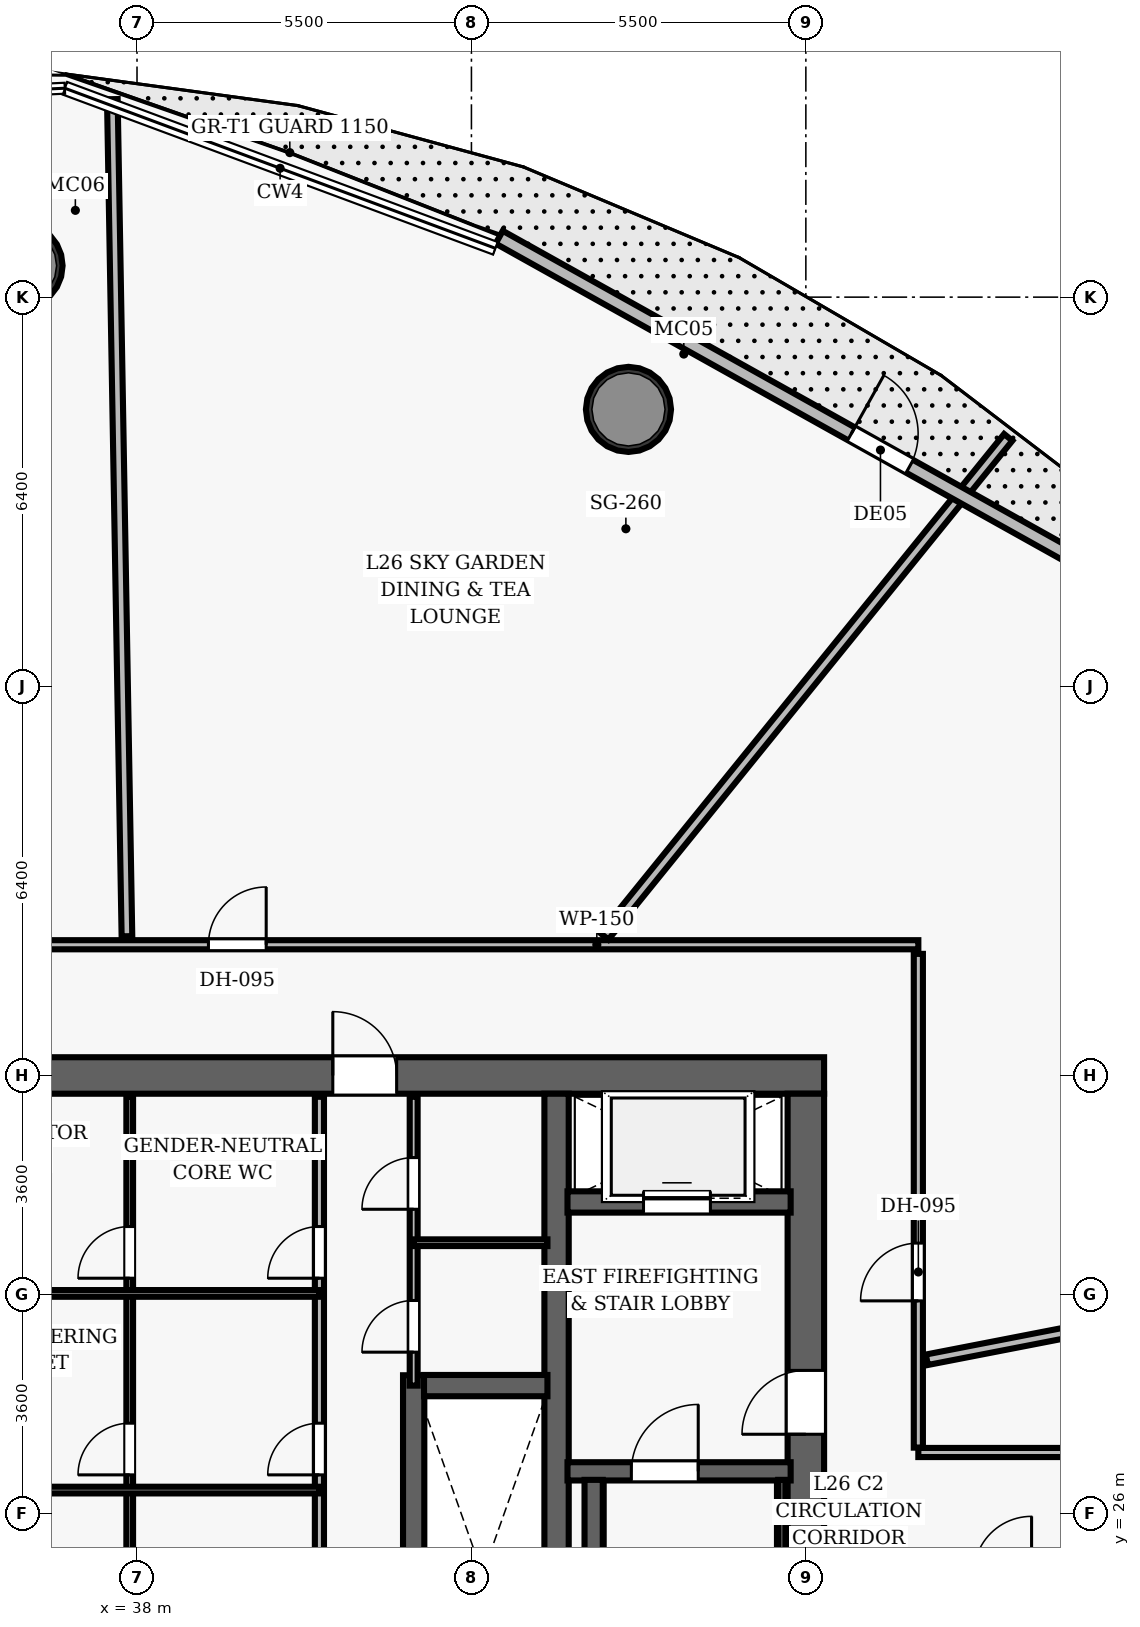
"""IFC4 building model, lengths in metres.
Left out: names, types, materials, properties, quantities, classifications, styles, units other than length and angle.
Written with IfcOpenShell. Run it as: python <this file> out.ifc"""

import sys

from ifc_helpers import new_model, si_unit, direction, frame, frame_2d, origin, origin_2d, place, context, subcontext, project, spatial, rectangle, hollow_circle, extrude, element, fill, save


model = new_model("IFC4")
c1 = context("Model", 3, precision=1e-05, world=origin(), true_north=direction((0.0, 1.0)))
c2 = subcontext(c1, "Body", "Model", "MODEL_VIEW")
j1 = project(units=[si_unit("LENGTHUNIT", "METRE"), si_unit("PLANEANGLEUNIT", "RADIAN")], contexts=[c1])
p1 = place(None, origin())
s1 = spatial("IfcSite", under=j1, at=p1, CompositionType="ELEMENT")
p2 = place(p1, origin())
s2 = spatial("IfcBuilding", under=s1, at=p2, CompositionType="ELEMENT")
p3 = place(p2, frame((0.0, 0.0, 109.8)))
s3 = spatial("IfcBuildingStorey", under=s2, at=p3, CompositionType="ELEMENT", Elevation=109.8)
p4 = place(p3, frame((26.7, 33.2, 0.0), z_axis=(0.0, 0.0, 1.0), x_axis=(1.0, 0.0, 0.0)))
e1 = element("IfcWall", 1, at=p4, inside=s3, PredefinedType="SHEAR", context=c2, shape_type="SweptSolid", body=[
    extrude(rectangle(XDim=22.6, YDim=0.6, at=frame_2d((11.3, 0.0))), origin(), (0.0, 0.0, 1.0), 3.5),
])
p5 = place(p4, frame((4.62, 0.0, 0.0)))
e2 = element("IfcOpeningElement", 2, at=p5, cuts=e1, PredefinedType="OPENING", context=c2, shape_type="SweptSolid", body=[
    extrude(rectangle(XDim=1.05, YDim=2.15, at=frame_2d((0.525, 1.075))), frame((0.0, 0.31, 0.0), z_axis=(0.0, -1.0, 0.0), x_axis=(1.0, 0.0, 0.0)), (0.0, 0.0, 1.0), 0.62),
])
p6 = place(p4, frame((14.52, 0.0, 0.0)))
e3 = element("IfcOpeningElement", 3, at=p6, cuts=e1, PredefinedType="OPENING", context=c2, shape_type="SweptSolid", body=[
    extrude(rectangle(XDim=1.05, YDim=2.15, at=frame_2d((0.525, 1.075))), frame((0.0, 0.31, 0.0), z_axis=(0.0, -1.0, 0.0), x_axis=(1.0, 0.0, 0.0)), (0.0, 0.0, 1.0), 0.62),
])
p7 = place(p3, frame((49.0, 19.1, 0.0), z_axis=(0.0, 0.0, 1.0), x_axis=(0.0, 1.0, 0.0)))
e4 = element("IfcWall", 4, at=p7, inside=s3, PredefinedType="SHEAR", context=c2, shape_type="SweptSolid", body=[
    extrude(rectangle(XDim=13.8, YDim=0.6, at=frame_2d((6.9, 0.0))), origin(), (0.0, 0.0, 1.0), 3.5),
])
p8 = place(p7, frame((8.2, 0.0, 0.0)))
e5 = element("IfcOpeningElement", 5, at=p8, cuts=e4, PredefinedType="OPENING", context=c2, shape_type="SweptSolid", body=[
    extrude(rectangle(XDim=1.05, YDim=2.15, at=frame_2d((0.525, 1.075))), frame((0.0, 0.31, 0.0), z_axis=(0.0, -1.0, 0.0), x_axis=(1.0, 0.0, 0.0)), (0.0, 0.0, 1.0), 0.62),
])
p9 = place(p3, frame((44.9, 19.1, 0.0), z_axis=(0.0, 0.0, 1.0), x_axis=(0.0, 1.0, 0.0)))
e6 = element("IfcWall", 6, at=p9, inside=s3, PredefinedType="SHEAR", context=c2, shape_type="SweptSolid", body=[
    extrude(rectangle(XDim=13.8, YDim=0.4, at=frame_2d((6.9, 0.0))), origin(), (0.0, 0.0, 1.0), 3.5),
])
for number, where, z_axis, x_axis in (
    (7, (46.083, 44.154, 0.0), (0.0, 0.0, 1.0), (1.0, 0.0, 0.0)),
    (8, (36.076, 46.517, 0.0), (0.0, 0.0, 1.0), (1.0, 0.0, 0.0)),
):
    element("IfcColumn", number, at=place(p3, frame(where, z_axis=z_axis, x_axis=x_axis)), inside=s3, PredefinedType="COLUMN", context=c2, shape_type="SweptSolid", body=[
        extrude(hollow_circle(Radius=0.7, WallThickness=0.055, at=origin_2d()), origin(), (0.0, 0.0, 1.0), 3.5),
    ])
p10 = place(p3, frame((45.08, 26.69, 0.0), z_axis=(0.0, 0.0, 1.0), x_axis=(1.0, 0.0, 0.0)))
e9 = element("IfcWall", 9, at=p10, inside=s3, PredefinedType="SHEAR", context=c2, shape_type="SweptSolid", body=[
    extrude(rectangle(XDim=3.67, YDim=0.3, at=frame_2d((1.835, 0.0))), origin(), (0.0, 0.0, 1.0), 3.5),
])
p11 = place(p10, frame((1.05, 0.0, 0.0)))
e10 = element("IfcOpeningElement", 10, at=p11, cuts=e9, PredefinedType="OPENING", context=c2, shape_type="SweptSolid", body=[
    extrude(rectangle(XDim=1.1, YDim=2.15, at=frame_2d((0.55, 1.075))), frame((0.0, 0.16, 0.0), z_axis=(0.0, -1.0, 0.0), x_axis=(1.0, 0.0, 0.0)), (0.0, 0.0, 1.0), 0.32),
])
p12 = place(p3, frame((45.51, 19.05, 0.0), z_axis=(0.0, 0.0, 1.0), x_axis=(0.0, 1.0, 0.0)))
e11 = element("IfcWall", 11, at=p12, inside=s3, PredefinedType="SHEAR", context=c2, shape_type="SweptSolid", body=[
    extrude(rectangle(XDim=7.5, YDim=0.3, at=frame_2d((3.75, 0.0))), origin(), (0.0, 0.0, 1.0), 3.5),
])
p13 = place(p3, frame((48.605, 19.1, 0.0), z_axis=(0.0, 0.0, 1.0), x_axis=(0.0, 1.0, 0.0)))
e12 = element("IfcWall", 12, at=p13, inside=s3, PredefinedType="SHEAR", context=c2, shape_type="SweptSolid", body=[
    extrude(rectangle(XDim=7.45, YDim=0.12, at=frame_2d((3.725, 0.0))), origin(), (0.0, 0.0, 1.0), 3.5),
])
p14 = place(p3, frame((45.08, 31.12, 0.0), z_axis=(0.0, 0.0, 1.0), x_axis=(1.0, 0.0, 0.0)))
e13 = element("IfcWall", 13, at=p14, inside=s3, PredefinedType="SHEAR", context=c2, shape_type="SweptSolid", body=[
    extrude(rectangle(XDim=3.67, YDim=0.35, at=frame_2d((1.835, 0.0))), origin(), (0.0, 0.0, 1.0), 2.675),
])
p15 = place(p14, frame((1.25, 0.0, 0.0)))
e14 = element("IfcOpeningElement", 14, at=p15, cuts=e13, PredefinedType="OPENING", context=c2, shape_type="SweptSolid", body=[
    extrude(rectangle(XDim=1.1, YDim=2.15, at=frame_2d((0.55, 1.075))), frame((0.0, 0.185, 0.0), z_axis=(0.0, -1.0, 0.0), x_axis=(1.0, 0.0, 0.0)), (0.0, 0.0, 1.0), 0.37),
])
p16 = place(p3, frame((42.55, 21.73, 0.0), z_axis=(0.0, 0.0, 1.0), x_axis=(0.0, 1.0, 0.0)))
e15 = element("IfcWall", 15, at=p16, inside=s3, PredefinedType="SHEAR", context=c2, shape_type="SweptSolid", body=[
    extrude(rectangle(XDim=6.54, YDim=0.35, at=frame_2d((3.27, 0.0))), origin(), (0.0, 0.0, 1.0), 2.675),
])
p17 = place(p3, frame((42.72, 28.1, 0.0), z_axis=(0.0, 0.0, 1.0), x_axis=(1.0, 0.0, 0.0)))
e16 = element("IfcWall", 16, at=p17, inside=s3, PredefinedType="SHEAR", context=c2, shape_type="SweptSolid", body=[
    extrude(rectangle(XDim=2.03, YDim=0.35, at=frame_2d((1.015, 0.0))), origin(), (0.0, 0.0, 1.0), 2.675),
])
p18 = place(p3, frame((41.0, 23.05, 0.0), z_axis=(0.0, 0.0, 1.0), x_axis=(0.0, 1.0, 0.0)))
e17 = element("IfcWall", 17, at=p18, inside=s3, PredefinedType="PARTITIONING", context=c2, shape_type="SweptSolid", body=[
    extrude(rectangle(XDim=9.8, YDim=0.15, at=frame_2d((4.9, 0.0))), origin(), (0.0, 0.0, 1.0), 2.675),
])
p19 = place(p18, frame((0.25, 0.0, 0.0)))
e18 = element("IfcOpeningElement", 18, at=p19, cuts=e17, PredefinedType="OPENING", context=c2, shape_type="SweptSolid", body=[
    extrude(rectangle(XDim=0.85, YDim=2.1, at=frame_2d((0.425, 1.05))), frame((0.0, 0.085, 0.0), z_axis=(0.0, -1.0, 0.0), x_axis=(1.0, 0.0, 0.0)), (0.0, 0.0, 1.0), 0.17),
])
p20 = place(p18, frame((3.582, 0.0, 0.0)))
e19 = element("IfcOpeningElement", 19, at=p20, cuts=e17, PredefinedType="OPENING", context=c2, shape_type="SweptSolid", body=[
    extrude(rectangle(XDim=0.85, YDim=2.1, at=frame_2d((0.425, 1.05))), frame((0.0, 0.085, 0.0), z_axis=(0.0, -1.0, 0.0), x_axis=(1.0, 0.0, 0.0)), (0.0, 0.0, 1.0), 0.17),
])
p21 = place(p18, frame((6.816, 0.0, 0.0)))
e20 = element("IfcOpeningElement", 20, at=p21, cuts=e17, PredefinedType="OPENING", context=c2, shape_type="SweptSolid", body=[
    extrude(rectangle(XDim=0.85, YDim=2.1, at=frame_2d((0.425, 1.05))), frame((0.0, 0.085, 0.0), z_axis=(0.0, -1.0, 0.0), x_axis=(1.0, 0.0, 0.0)), (0.0, 0.0, 1.0), 0.17),
])
p22 = place(p3, frame((37.88, 23.05, 0.0), z_axis=(0.0, 0.0, 1.0), x_axis=(0.0, 1.0, 0.0)))
e21 = element("IfcWall", 21, at=p22, inside=s3, PredefinedType="PARTITIONING", context=c2, shape_type="SweptSolid", body=[
    extrude(rectangle(XDim=9.8, YDim=0.11, at=frame_2d((4.9, 0.0))), origin(), (0.0, 0.0, 1.0), 2.675),
])
p23 = place(p22, frame((0.25, 0.0, 0.0)))
e22 = element("IfcOpeningElement", 22, at=p23, cuts=e21, PredefinedType="OPENING", context=c2, shape_type="SweptSolid", body=[
    extrude(rectangle(XDim=0.85, YDim=2.1, at=frame_2d((0.425, 1.05))), frame((0.0, 0.065, 0.0), z_axis=(0.0, -1.0, 0.0), x_axis=(1.0, 0.0, 0.0)), (0.0, 0.0, 1.0), 0.13),
])
p24 = place(p22, frame((3.582, 0.0, 0.0)))
e23 = element("IfcOpeningElement", 23, at=p24, cuts=e21, PredefinedType="OPENING", context=c2, shape_type="SweptSolid", body=[
    extrude(rectangle(XDim=0.85, YDim=2.1, at=frame_2d((0.425, 1.05))), frame((0.0, 0.065, 0.0), z_axis=(0.0, -1.0, 0.0), x_axis=(1.0, 0.0, 0.0)), (0.0, 0.0, 1.0), 0.13),
])
p25 = place(p22, frame((6.816, 0.0, 0.0)))
e24 = element("IfcOpeningElement", 24, at=p25, cuts=e21, PredefinedType="OPENING", context=c2, shape_type="SweptSolid", body=[
    extrude(rectangle(XDim=0.85, YDim=2.1, at=frame_2d((0.425, 1.05))), frame((0.0, 0.065, 0.0), z_axis=(0.0, -1.0, 0.0), x_axis=(1.0, 0.0, 0.0)), (0.0, 0.0, 1.0), 0.13),
])
for number, where, z_axis, x_axis in (
    (25, (34.75, 26.382, 0.0), (0.0, 0.0, 1.0), (1.0, 0.0, 0.0)),
    (26, (34.75, 29.616, 0.0), (0.0, 0.0, 1.0), (1.0, 0.0, 0.0)),
):
    element("IfcWall", number, at=place(p3, frame(where, z_axis=z_axis, x_axis=x_axis)), inside=s3, PredefinedType="PARTITIONING", context=c2, shape_type="SweptSolid", body=[
        extrude(rectangle(XDim=6.25, YDim=0.11, at=frame_2d((3.125, 0.0))), origin(), (0.0, 0.0, 1.0), 2.675),
    ])
p26 = place(p3, frame((42.55, 28.1, 0.0), z_axis=(0.0, 0.0, 1.0), x_axis=(0.0, 1.0, 0.0)))
e27 = element("IfcWall", 27, at=p26, inside=s3, PredefinedType="PARTITIONING", context=c2, shape_type="SweptSolid", body=[
    extrude(rectangle(XDim=4.75, YDim=0.13, at=frame_2d((2.375, 0.0))), origin(), (0.0, 0.0, 1.0), 2.675),
])
p27 = place(p26, frame((0.55, 0.0, 0.0)))
e28 = element("IfcOpeningElement", 28, at=p27, cuts=e27, PredefinedType="OPENING", context=c2, shape_type="SweptSolid", body=[
    extrude(rectangle(XDim=0.85, YDim=2.1, at=frame_2d((0.425, 1.05))), frame((0.0, 0.075, 0.0), z_axis=(0.0, -1.0, 0.0), x_axis=(1.0, 0.0, 0.0)), (0.0, 0.0, 1.0), 0.15),
])
p28 = place(p26, frame((2.9, 0.0, 0.0)))
e29 = element("IfcOpeningElement", 29, at=p28, cuts=e27, PredefinedType="OPENING", context=c2, shape_type="SweptSolid", body=[
    extrude(rectangle(XDim=0.85, YDim=2.1, at=frame_2d((0.425, 1.05))), frame((0.0, 0.075, 0.0), z_axis=(0.0, -1.0, 0.0), x_axis=(1.0, 0.0, 0.0)), (0.0, 0.0, 1.0), 0.15),
])
p29 = place(p3, frame((42.55, 30.45, 0.0), z_axis=(0.0, 0.0, 1.0), x_axis=(1.0, 0.0, 0.0)))
e30 = element("IfcWall", 30, at=p29, inside=s3, PredefinedType="PARTITIONING", context=c2, shape_type="SweptSolid", body=[
    extrude(rectangle(XDim=2.2, YDim=0.11, at=frame_2d((1.1, 0.0))), origin(), (0.0, 0.0, 1.0), 2.675),
])
p30 = place(p3, frame((24.85, 35.35, 0.0), z_axis=(0.0, 0.0, 1.0), x_axis=(1.0, 0.0, 0.0)))
e31 = element("IfcWall", 31, at=p30, inside=s3, PredefinedType="PARTITIONING", context=c2, shape_type="SweptSolid", body=[
    extrude(rectangle(XDim=26.0, YDim=0.15, at=frame_2d((13.0, 0.0))), origin(), (0.0, 0.0, 1.0), 2.675),
])
p31 = place(p30, frame((14.325, 0.0, 0.0)))
e32 = element("IfcOpeningElement", 32, at=p31, cuts=e31, PredefinedType="OPENING", context=c2, shape_type="SweptSolid", body=[
    extrude(rectangle(XDim=0.95, YDim=2.15, at=frame_2d((0.475, 1.075))), frame((0.0, 0.085, 0.0), z_axis=(0.0, -1.0, 0.0), x_axis=(1.0, 0.0, 0.0)), (0.0, 0.0, 1.0), 0.17),
])
p32 = place(p30, frame((7.162, 0.0, 0.0)))
e33 = element("IfcOpeningElement", 33, at=p32, cuts=e31, PredefinedType="OPENING", context=c2, shape_type="SweptSolid", body=[
    extrude(rectangle(XDim=0.95, YDim=2.15, at=frame_2d((0.475, 1.075))), frame((0.0, 0.085, 0.0), z_axis=(0.0, -1.0, 0.0), x_axis=(1.0, 0.0, 0.0)), (0.0, 0.0, 1.0), 0.17),
])
p33 = place(p3, frame((50.85, 27.08, 0.0), z_axis=(0.0, 0.0, 1.0), x_axis=(0.0, 1.0, 0.0)))
e34 = element("IfcWall", 34, at=p33, inside=s3, PredefinedType="PARTITIONING", context=c2, shape_type="SweptSolid", body=[
    extrude(rectangle(XDim=8.12, YDim=0.15, at=frame_2d((4.06, 0.0))), origin(), (0.0, 0.0, 1.0), 2.675),
])
p34 = place(p33, frame((2.414, 0.0, 0.0)))
e35 = element("IfcOpeningElement", 35, at=p34, cuts=e34, PredefinedType="OPENING", context=c2, shape_type="SweptSolid", body=[
    extrude(rectangle(XDim=0.95, YDim=2.15, at=frame_2d((0.475, 1.075))), frame((0.0, 0.085, 0.0), z_axis=(0.0, -1.0, 0.0), x_axis=(1.0, 0.0, 0.0)), (0.0, 0.0, 1.0), 0.17),
])
p35 = place(p3, frame((50.85, 27.0, 0.0), z_axis=(0.0, 0.0, 1.0), x_axis=(1.0, 0.0, 0.0)))
e36 = element("IfcWall", 36, at=p35, inside=s3, PredefinedType="PARTITIONING", context=c2, shape_type="SweptSolid", body=[
    extrude(rectangle(XDim=10.65, YDim=0.15, at=frame_2d((5.325, 0.0))), origin(), (0.0, 0.0, 1.0), 2.675),
])
p36 = place(p3, frame((50.99, 28.525, 0.0), z_axis=(0.0, 0.0, 1.0), x_axis=(0.981627073332, 0.190809561873, 0.0)))
e37 = element("IfcWall", 37, at=p36, inside=s3, PredefinedType="PARTITIONING", context=c2, shape_type="SweptSolid", body=[
    extrude(rectangle(XDim=12.287, YDim=0.175, at=frame_2d((6.144, 0.0))), origin(), (0.0, 0.0, 1.0), 2.675),
])
p37 = place(p3, frame((45.685, 35.49, 0.0), z_axis=(0.0, 0.0, 1.0), x_axis=(0.629334600488, 0.777134454665, 0.0)))
e38 = element("IfcWall", 38, at=p37, inside=s3, PredefinedType="PARTITIONING", context=c2, shape_type="SweptSolid", body=[
    extrude(rectangle(XDim=10.557, YDim=0.175, at=frame_2d((5.278, 0.0))), origin(), (0.0, 0.0, 1.0), 2.675),
])
p38 = place(p3, frame((37.834, 35.49, 0.0), z_axis=(0.0, 0.0, 1.0), x_axis=(-0.017466829804, 0.999847443292, 0.0)))
e39 = element("IfcWall", 39, at=p38, inside=s3, PredefinedType="PARTITIONING", context=c2, shape_type="SweptSolid", body=[
    extrude(rectangle(XDim=13.768, YDim=0.175, at=frame_2d((6.884, 0.0))), origin(), (0.0, 0.0, 1.0), 2.675),
])
p39 = place(p3, frame((43.957, 46.986, 0.0), z_axis=(0.0, 0.0, 1.0), x_axis=(0.873174857764, -0.487407086293, 0.0)))
e40 = element("IfcWall", 40, at=p39, inside=s3, PredefinedType="SOLIDWALL", context=c2, shape_type="SweptSolid", body=[
    extrude(rectangle(XDim=14.914, YDim=0.24, at=frame_2d((7.457, 0.0))), origin(), (0.0, 0.0, 1.0), 2.45),
])
p40 = place(p39, frame((6.631, 0.0, 0.0)))
e41 = element("IfcOpeningElement", 41, at=p40, cuts=e40, PredefinedType="OPENING", context=c2, shape_type="SweptSolid", body=[
    extrude(rectangle(XDim=1.1, YDim=2.2, at=frame_2d((0.55, 1.1))), frame((0.0, 0.13, 0.0), z_axis=(0.0, -1.0, 0.0), x_axis=(1.0, 0.0, 0.0)), (0.0, 0.0, 1.0), 0.26),
])
p41 = place(p11, origin())
e42 = element("IfcDoor", 42, at=p41, inside=s3, OperationType="SINGLE_SWING_RIGHT", PredefinedType="DOOR", context=c2, shape_type="SweptSolid", body=[
    extrude(rectangle(XDim=1.1, YDim=2.15, at=frame_2d((0.55, 1.075))), frame((0.0, 0.025, 0.0), z_axis=(0.0, -1.0, 0.0), x_axis=(1.0, 0.0, 0.0)), (0.0, 0.0, 1.0), 0.05),
])
fill(e10, e42)
p42 = place(p8, origin())
e43 = element("IfcDoor", 43, at=p42, inside=s3, OperationType="SINGLE_SWING_LEFT", PredefinedType="DOOR", context=c2, shape_type="SweptSolid", body=[
    extrude(rectangle(XDim=1.05, YDim=2.15, at=frame_2d((0.525, 1.075))), frame((0.0, 0.025, 0.0), z_axis=(0.0, -1.0, 0.0), x_axis=(1.0, 0.0, 0.0)), (0.0, 0.0, 1.0), 0.05),
])
fill(e5, e43)
p43 = place(p6, origin())
e44 = element("IfcDoor", 44, at=p43, inside=s3, OperationType="SINGLE_SWING_LEFT", PredefinedType="DOOR", context=c2, shape_type="SweptSolid", body=[
    extrude(rectangle(XDim=1.05, YDim=2.15, at=frame_2d((0.525, 1.075))), frame((0.0, 0.025, 0.0), z_axis=(0.0, -1.0, 0.0), x_axis=(1.0, 0.0, 0.0)), (0.0, 0.0, 1.0), 0.05),
])
fill(e3, e44)
p44 = place(p20, origin())
e45 = element("IfcDoor", 45, at=p44, inside=s3, OperationType="SINGLE_SWING_LEFT", PredefinedType="DOOR", context=c2, shape_type="SweptSolid", body=[
    extrude(rectangle(XDim=0.85, YDim=2.1, at=frame_2d((0.425, 1.05))), frame((0.0, 0.025, 0.0), z_axis=(0.0, -1.0, 0.0), x_axis=(1.0, 0.0, 0.0)), (0.0, 0.0, 1.0), 0.05),
])
fill(e19, e45)
p45 = place(p24, origin())
e46 = element("IfcDoor", 46, at=p45, inside=s3, OperationType="SINGLE_SWING_LEFT", PredefinedType="DOOR", context=c2, shape_type="SweptSolid", body=[
    extrude(rectangle(XDim=0.85, YDim=2.1, at=frame_2d((0.425, 1.05))), frame((0.0, 0.025, 0.0), z_axis=(0.0, -1.0, 0.0), x_axis=(1.0, 0.0, 0.0)), (0.0, 0.0, 1.0), 0.05),
])
fill(e23, e46)
p46 = place(p21, origin())
e47 = element("IfcDoor", 47, at=p46, inside=s3, OperationType="SINGLE_SWING_LEFT", PredefinedType="DOOR", context=c2, shape_type="SweptSolid", body=[
    extrude(rectangle(XDim=0.85, YDim=2.1, at=frame_2d((0.425, 1.05))), frame((0.0, 0.025, 0.0), z_axis=(0.0, -1.0, 0.0), x_axis=(1.0, 0.0, 0.0)), (0.0, 0.0, 1.0), 0.05),
])
fill(e20, e47)
p47 = place(p25, origin())
e48 = element("IfcDoor", 48, at=p47, inside=s3, OperationType="SINGLE_SWING_LEFT", PredefinedType="DOOR", context=c2, shape_type="SweptSolid", body=[
    extrude(rectangle(XDim=0.85, YDim=2.1, at=frame_2d((0.425, 1.05))), frame((0.0, 0.025, 0.0), z_axis=(0.0, -1.0, 0.0), x_axis=(1.0, 0.0, 0.0)), (0.0, 0.0, 1.0), 0.05),
])
fill(e24, e48)
p48 = place(p27, origin())
e49 = element("IfcDoor", 49, at=p48, inside=s3, OperationType="SINGLE_SWING_LEFT", PredefinedType="DOOR", context=c2, shape_type="SweptSolid", body=[
    extrude(rectangle(XDim=0.85, YDim=2.1, at=frame_2d((0.425, 1.05))), frame((0.0, 0.025, 0.0), z_axis=(0.0, -1.0, 0.0), x_axis=(1.0, 0.0, 0.0)), (0.0, 0.0, 1.0), 0.05),
])
fill(e28, e49)
p49 = place(p28, origin())
e50 = element("IfcDoor", 50, at=p49, inside=s3, OperationType="SINGLE_SWING_LEFT", PredefinedType="DOOR", context=c2, shape_type="SweptSolid", body=[
    extrude(rectangle(XDim=0.85, YDim=2.1, at=frame_2d((0.425, 1.05))), frame((0.0, 0.025, 0.0), z_axis=(0.0, -1.0, 0.0), x_axis=(1.0, 0.0, 0.0)), (0.0, 0.0, 1.0), 0.05),
])
fill(e29, e50)
p50 = place(p34, origin())
e51 = element("IfcDoor", 51, at=p50, inside=s3, OperationType="SINGLE_SWING_LEFT", PredefinedType="DOOR", context=c2, shape_type="SweptSolid", body=[
    extrude(rectangle(XDim=0.95, YDim=2.15, at=frame_2d((0.475, 1.075))), frame((0.0, 0.025, 0.0), z_axis=(0.0, -1.0, 0.0), x_axis=(1.0, 0.0, 0.0)), (0.0, 0.0, 1.0), 0.05),
])
fill(e35, e51)
p51 = place(p31, origin())
e52 = element("IfcDoor", 52, at=p51, inside=s3, OperationType="SINGLE_SWING_RIGHT", PredefinedType="DOOR", context=c2, shape_type="SweptSolid", body=[
    extrude(rectangle(XDim=0.95, YDim=2.15, at=frame_2d((0.475, 1.075))), frame((0.0, 0.025, 0.0), z_axis=(0.0, -1.0, 0.0), x_axis=(1.0, 0.0, 0.0)), (0.0, 0.0, 1.0), 0.05),
])
fill(e32, e52)
p52 = place(p15, origin())
e53 = element("IfcDoor", 53, at=p52, inside=s3, OperationType="SLIDING_TO_LEFT", PredefinedType="DOOR", context=c2, shape_type="SweptSolid", body=[
    extrude(rectangle(XDim=1.1, YDim=2.15, at=frame_2d((0.55, 1.075))), frame((0.0, 0.025, 0.0), z_axis=(0.0, -1.0, 0.0), x_axis=(1.0, 0.0, 0.0)), (0.0, 0.0, 1.0), 0.05),
])
fill(e14, e53)
p53 = place(p40, origin())
e54 = element("IfcDoor", 54, at=p53, inside=s3, OperationType="SINGLE_SWING_LEFT", PredefinedType="DOOR", context=c2, shape_type="SweptSolid", body=[
    extrude(rectangle(XDim=1.1, YDim=2.2, at=frame_2d((0.55, 1.1))), frame((0.0, 0.025, 0.0), z_axis=(0.0, -1.0, 0.0), x_axis=(1.0, 0.0, 0.0)), (0.0, 0.0, 1.0), 0.05),
])
fill(e41, e54)
save(model, sys.argv[1])
